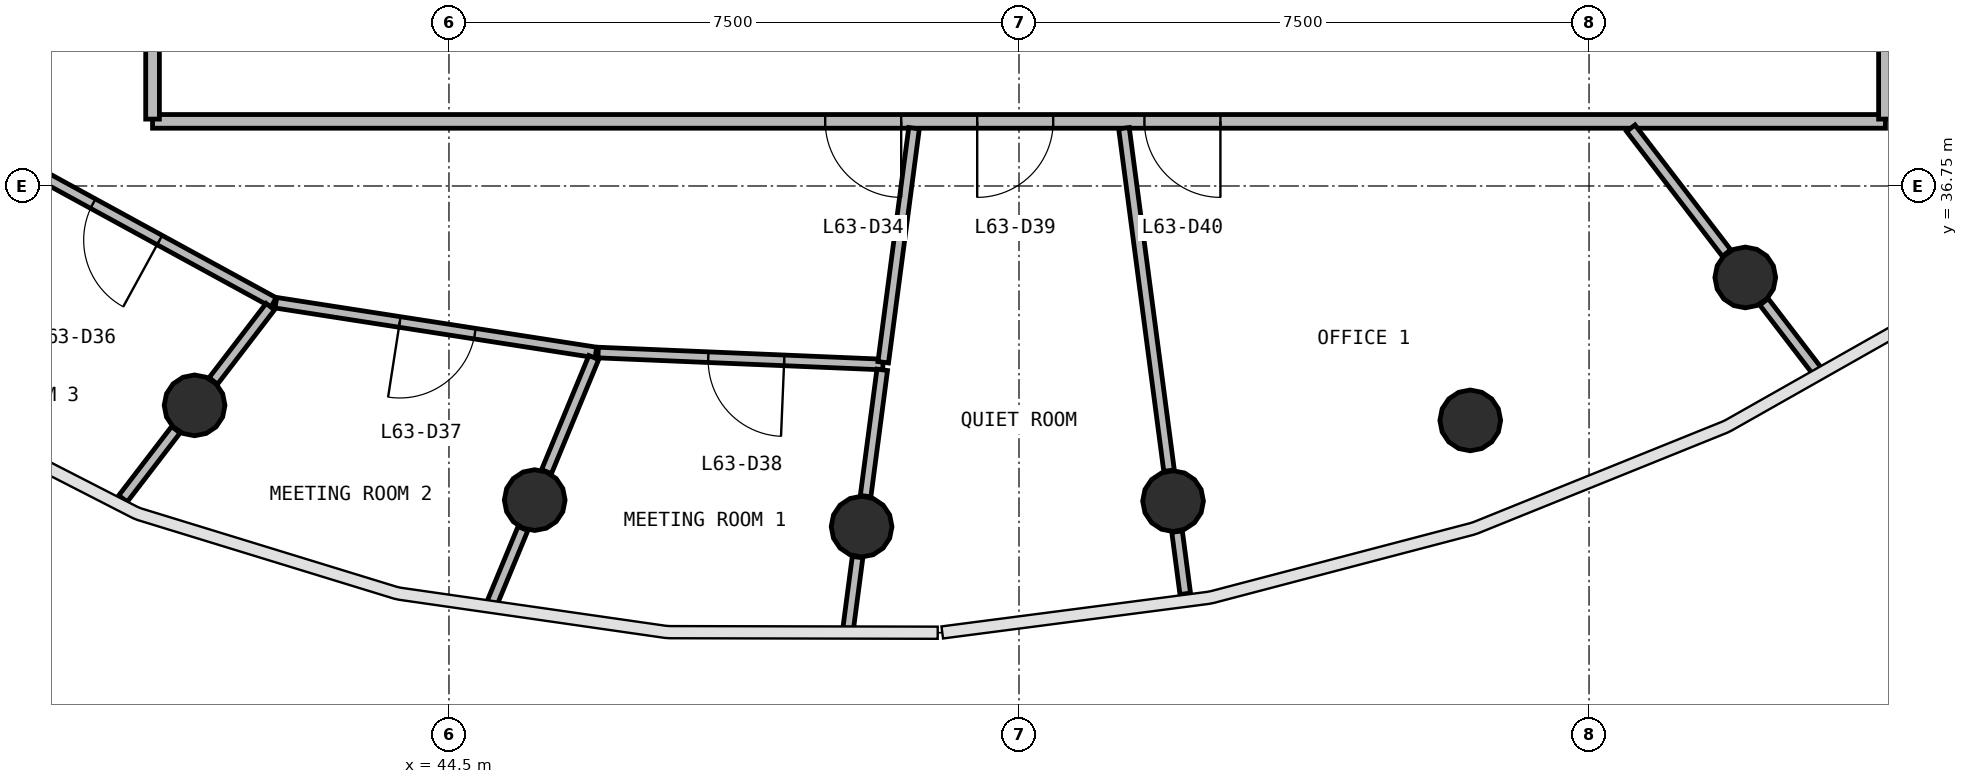
"""IFC4 building model, lengths in metres.
Left out: names, types, materials, properties, quantities, classifications, styles, units other than length and angle.
Written with IfcOpenShell. Run it as: python <this file> out.ifc"""

import sys

from ifc_helpers import new_model, si_unit, direction, frame, frame_2d, origin, origin_2d, place, context, subcontext, project, spatial, rectangle, circle, extrude, source, transform, mapped, element, fill, save


model = new_model("IFC4")
c1 = context("Model", 3, precision=1e-05, world=origin(), true_north=direction((0.0, 1.0)))
c2 = subcontext(c1, "Body", "Model", "MODEL_VIEW")
j1 = project(units=[si_unit("LENGTHUNIT", "METRE"), si_unit("PLANEANGLEUNIT", "RADIAN")], contexts=[c1])
p1 = place(None, origin())
s1 = spatial("IfcSite", under=j1, at=p1, CompositionType="ELEMENT")
p2 = place(p1, origin())
s2 = spatial("IfcBuilding", under=s1, at=p2, CompositionType="ELEMENT")
p3 = place(p2, frame((0.0, 0.0, 257.9)))
s3 = spatial("IfcBuildingStorey", under=s2, at=p3, CompositionType="ELEMENT", Elevation=257.9)
m1 = source(origin(), c2, "Body", "SweptSolid", [
    extrude(circle(Radius=0.4, at=origin_2d()), origin(), (0.0, 0.0, 1.0), 3.9),
])
for number, where, z_axis, x_axis in (
    (1, (41.153, 33.864, 0.0), (0.0, 0.0, 1.0), (1.0, 0.0, 0.0)),
    (2, (45.628, 32.617, 0.0), (0.0, 0.0, 1.0), (1.0, 0.0, 0.0)),
    (3, (49.929, 32.269, 0.0), (0.0, 0.0, 1.0), (1.0, 0.0, 0.0)),
    (4, (54.027, 32.604, 0.0), (0.0, 0.0, 1.0), (1.0, 0.0, 0.0)),
    (5, (57.937, 33.666, 0.0), (0.0, 0.0, 1.0), (1.0, 0.0, 0.0)),
    (6, (61.556, 35.547, 0.0), (0.0, 0.0, 1.0), (1.0, 0.0, 0.0)),
):
    element("IfcColumn", number, at=place(p3, frame(where, z_axis=z_axis, x_axis=x_axis)), inside=s3, PredefinedType="COLUMN", context=c2, shape_type="MappedRepresentation", body=[
        mapped(m1, transform((0.0, 0.0, 0.0), scale=1.0)),
    ])
p4 = place(p3, frame((63.4, 37.6, 0.0), z_axis=(0.0, 0.0, 1.0), x_axis=(-1.0, 0.0, 0.0)))
e7 = element("IfcWall", 7, at=p4, inside=s3, PredefinedType="PARTITIONING", context=c2, shape_type="SweptSolid", body=[
    extrude(rectangle(XDim=22.8, YDim=0.18, at=frame_2d((11.4, 0.0))), origin(), (0.0, 0.0, 1.0), 2.88),
])
p5 = place(p4, frame((12.95, 0.0, 0.0)))
e8 = element("IfcOpeningElement", 8, at=p5, cuts=e7, PredefinedType="OPENING", context=c2, shape_type="SweptSolid", body=[
    extrude(rectangle(XDim=1.0, YDim=2.1, at=frame_2d((0.5, 1.05))), frame((0.0, 0.1, 0.0), z_axis=(0.0, -1.0, 0.0), x_axis=(1.0, 0.0, 0.0)), (0.0, 0.0, 1.0), 0.2),
])
p6 = place(p4, frame((10.95, 0.0, 0.0)))
e9 = element("IfcOpeningElement", 9, at=p6, cuts=e7, PredefinedType="OPENING", context=c2, shape_type="SweptSolid", body=[
    extrude(rectangle(XDim=1.0, YDim=2.1, at=frame_2d((0.5, 1.05))), frame((0.0, 0.1, 0.0), z_axis=(0.0, -1.0, 0.0), x_axis=(1.0, 0.0, 0.0)), (0.0, 0.0, 1.0), 0.2),
])
p7 = place(p4, frame((8.75, 0.0, 0.0)))
e10 = element("IfcOpeningElement", 10, at=p7, cuts=e7, PredefinedType="OPENING", context=c2, shape_type="SweptSolid", body=[
    extrude(rectangle(XDim=1.0, YDim=2.1, at=frame_2d((0.5, 1.05))), frame((0.0, 0.1, 0.0), z_axis=(0.0, -1.0, 0.0), x_axis=(1.0, 0.0, 0.0)), (0.0, 0.0, 1.0), 0.2),
])
p8 = place(p3, frame((63.4, 58.37, 0.0), z_axis=(0.0, 0.0, 1.0), x_axis=(0.0, -1.0, 0.0)))
e11 = element("IfcWall", 11, at=p8, inside=s3, PredefinedType="PARTITIONING", context=c2, shape_type="SweptSolid", body=[
    extrude(rectangle(XDim=20.74, YDim=0.18, at=frame_2d((10.37, 0.0))), origin(), (0.0, 0.0, 1.0), 2.88),
])
p9 = place(p8, frame((9.99, 0.0, 0.0)))
e12 = element("IfcOpeningElement", 12, at=p9, cuts=e11, PredefinedType="OPENING", context=c2, shape_type="SweptSolid", body=[
    extrude(rectangle(XDim=0.9, YDim=2.1, at=frame_2d((0.45, 1.05))), frame((0.0, 0.1, 0.0), z_axis=(0.0, -1.0, 0.0), x_axis=(1.0, 0.0, 0.0)), (0.0, 0.0, 1.0), 0.2),
])
p10 = place(p8, frame((7.79, 0.0, 0.0)))
e13 = element("IfcOpeningElement", 13, at=p10, cuts=e11, PredefinedType="OPENING", context=c2, shape_type="SweptSolid", body=[
    extrude(rectangle(XDim=0.9, YDim=2.1, at=frame_2d((0.45, 1.05))), frame((0.0, 0.1, 0.0), z_axis=(0.0, -1.0, 0.0), x_axis=(1.0, 0.0, 0.0)), (0.0, 0.0, 1.0), 0.2),
])
p11 = place(p8, frame((4.29, 0.0, 0.0)))
e14 = element("IfcOpeningElement", 14, at=p11, cuts=e11, PredefinedType="OPENING", context=c2, shape_type="SweptSolid", body=[
    extrude(rectangle(XDim=1.0, YDim=2.1, at=frame_2d((0.5, 1.05))), frame((0.0, 0.1, 0.0), z_axis=(0.0, -1.0, 0.0), x_axis=(1.0, 0.0, 0.0)), (0.0, 0.0, 1.0), 0.2),
])
p12 = place(p8, frame((15.49, 0.0, 0.0)))
e15 = element("IfcOpeningElement", 15, at=p12, cuts=e11, PredefinedType="OPENING", context=c2, shape_type="SweptSolid", body=[
    extrude(rectangle(XDim=1.0, YDim=2.1, at=frame_2d((0.5, 1.05))), frame((0.0, 0.1, 0.0), z_axis=(0.0, -1.0, 0.0), x_axis=(1.0, 0.0, 0.0)), (0.0, 0.0, 1.0), 0.2),
])
p13 = place(p8, frame((12.09, 0.0, 0.0)))
e16 = element("IfcOpeningElement", 16, at=p13, cuts=e11, PredefinedType="OPENING", context=c2, shape_type="SweptSolid", body=[
    extrude(rectangle(XDim=1.0, YDim=2.1, at=frame_2d((0.5, 1.05))), frame((0.0, 0.1, 0.0), z_axis=(0.0, -1.0, 0.0), x_axis=(1.0, 0.0, 0.0)), (0.0, 0.0, 1.0), 0.2),
])
p14 = place(p3, frame((40.6, 37.63, 0.0), z_axis=(0.0, 0.0, 1.0), x_axis=(0.0, 1.0, 0.0)))
e17 = element("IfcWall", 17, at=p14, inside=s3, PredefinedType="PARTITIONING", context=c2, shape_type="SweptSolid", body=[
    extrude(rectangle(XDim=20.74, YDim=0.18, at=frame_2d((10.37, 0.0))), origin(), (0.0, 0.0, 1.0), 2.88),
])
p15 = place(p14, frame((12.09, 0.0, 0.0)))
e18 = element("IfcOpeningElement", 18, at=p15, cuts=e17, PredefinedType="OPENING", context=c2, shape_type="SweptSolid", body=[
    extrude(rectangle(XDim=1.0, YDim=2.1, at=frame_2d((0.5, 1.05))), frame((0.0, 0.1, 0.0), z_axis=(0.0, -1.0, 0.0), x_axis=(1.0, 0.0, 0.0)), (0.0, 0.0, 1.0), 0.2),
])
p16 = place(p14, frame((9.89, 0.0, 0.0)))
e19 = element("IfcOpeningElement", 19, at=p16, cuts=e17, PredefinedType="OPENING", context=c2, shape_type="SweptSolid", body=[
    extrude(rectangle(XDim=1.0, YDim=2.1, at=frame_2d((0.5, 1.05))), frame((0.0, 0.1, 0.0), z_axis=(0.0, -1.0, 0.0), x_axis=(1.0, 0.0, 0.0)), (0.0, 0.0, 1.0), 0.2),
])
p17 = place(p3, frame((53.381, 37.51, 0.0), z_axis=(0.0, 0.0, 1.0), x_axis=(0.130505936446, -0.991447527887, 0.0)))
e20 = element("IfcWall", 20, at=p17, inside=s3, PredefinedType="PARTITIONING", context=c2, shape_type="SweptSolid", body=[
    extrude(rectangle(XDim=4.544, YDim=0.14, at=frame_2d((2.272, 0.0))), origin(), (0.0, 0.0, 1.0), 2.88),
])
p18 = place(p3, frame((42.193, 35.219, 0.0), z_axis=(0.0, 0.0, 1.0), x_axis=(-0.877448984614, 0.479669969249, 0.0)))
e21 = element("IfcWall", 21, at=p18, inside=s3, PredefinedType="PARTITIONING", context=c2, shape_type="SweptSolid", body=[
    extrude(rectangle(XDim=4.558, YDim=0.14, at=frame_2d((2.279, 0.0))), origin(), (0.0, 0.0, 1.0), 2.88),
])
p19 = place(p18, frame((1.708, 0.0, 0.0)))
e22 = element("IfcOpeningElement", 22, at=p19, cuts=e21, PredefinedType="OPENING", context=c2, shape_type="SweptSolid", body=[
    extrude(rectangle(XDim=1.0, YDim=2.1, at=frame_2d((0.5, 1.05))), frame((0.0, 0.08, 0.0), z_axis=(0.0, -1.0, 0.0), x_axis=(1.0, 0.0, 0.0)), (0.0, 0.0, 1.0), 0.16),
])
p20 = place(p3, frame((46.433, 34.56, 0.0), z_axis=(0.0, 0.0, 1.0), x_axis=(-0.988131354716, 0.153611281572, 0.0)))
e23 = element("IfcWall", 23, at=p20, inside=s3, PredefinedType="PARTITIONING", context=c2, shape_type="SweptSolid", body=[
    extrude(rectangle(XDim=4.261, YDim=0.14, at=frame_2d((2.13, 0.0))), origin(), (0.0, 0.0, 1.0), 2.88),
])
p21 = place(p20, frame((1.611, 0.0, 0.0)))
e24 = element("IfcOpeningElement", 24, at=p21, cuts=e23, PredefinedType="OPENING", context=c2, shape_type="SweptSolid", body=[
    extrude(rectangle(XDim=1.0, YDim=2.1, at=frame_2d((0.5, 1.05))), frame((0.0, 0.08, 0.0), z_axis=(0.0, -1.0, 0.0), x_axis=(1.0, 0.0, 0.0)), (0.0, 0.0, 1.0), 0.16),
])
p22 = place(p3, frame((50.21, 34.401, 0.0), z_axis=(0.0, 0.0, 1.0), x_axis=(-0.999118002039, 0.041990689471, 0.0)))
e25 = element("IfcWall", 25, at=p22, inside=s3, PredefinedType="PARTITIONING", context=c2, shape_type="SweptSolid", body=[
    extrude(rectangle(XDim=3.75, YDim=0.14, at=frame_2d((1.875, 0.0))), origin(), (0.0, 0.0, 1.0), 2.88),
])
p23 = place(p22, frame((1.3, 0.0, 0.0)))
e26 = element("IfcOpeningElement", 26, at=p23, cuts=e25, PredefinedType="OPENING", context=c2, shape_type="SweptSolid", body=[
    extrude(rectangle(XDim=1.0, YDim=2.1, at=frame_2d((0.5, 1.05))), frame((0.0, 0.08, 0.0), z_axis=(0.0, -1.0, 0.0), x_axis=(1.0, 0.0, 0.0)), (0.0, 0.0, 1.0), 0.16),
])
p24 = place(p3, frame((50.619, 37.51, 0.0), z_axis=(0.0, 0.0, 1.0), x_axis=(-0.130495182838, -0.991448943343, 0.0)))
e27 = element("IfcWall", 27, at=p24, inside=s3, PredefinedType="PARTITIONING", context=c2, shape_type="SweptSolid", body=[
    extrude(rectangle(XDim=3.106, YDim=0.14, at=frame_2d((1.553, 0.0))), origin(), (0.0, 0.0, 1.0), 2.88),
])
p25 = place(p3, frame((60.049, 37.51, 0.0), z_axis=(0.0, 0.0, 1.0), x_axis=(0.608701397958, -0.793399400128, 0.0)))
e28 = element("IfcWall", 28, at=p25, inside=s3, PredefinedType="PARTITIONING", context=c2, shape_type="SweptSolid", body=[
    extrude(rectangle(XDim=2.07, YDim=0.14, at=frame_2d((1.035, 0.0))), origin(), (0.0, 0.0, 1.0), 2.88),
])
p26 = place(p3, frame((50.2, 34.331, 0.0), z_axis=(0.0, 0.0, 1.0), x_axis=(-0.13054119413, -0.991442886219, 0.0)))
e29 = element("IfcWall", 29, at=p26, inside=s3, PredefinedType="PARTITIONING", context=c2, shape_type="SweptSolid", body=[
    extrude(rectangle(XDim=1.676, YDim=0.14, at=frame_2d((0.838, 0.0))), origin(), (0.0, 0.0, 1.0), 2.88),
])
p27 = place(p3, frame((46.405, 34.493, 0.0), z_axis=(0.0, 0.0, 1.0), x_axis=(-0.382705531501, -0.92387037844, 0.0)))
e30 = element("IfcWall", 30, at=p27, inside=s3, PredefinedType="PARTITIONING", context=c2, shape_type="SweptSolid", body=[
    extrude(rectangle(XDim=1.625, YDim=0.14, at=frame_2d((0.813, 0.0))), origin(), (0.0, 0.0, 1.0), 2.88),
])
p28 = place(p3, frame((42.15, 35.163, 0.0), z_axis=(0.0, 0.0, 1.0), x_axis=(-0.608839083006, -0.793293748245, 0.0)))
e31 = element("IfcWall", 31, at=p28, inside=s3, PredefinedType="PARTITIONING", context=c2, shape_type="SweptSolid", body=[
    extrude(rectangle(XDim=1.232, YDim=0.14, at=frame_2d((0.616, 0.0))), origin(), (0.0, 0.0, 1.0), 2.88),
])
for number, where, z_axis, x_axis in (
    (32, (61.802, 35.226, 0.0), (0.0, 0.0, 1.0), (0.609, -0.793, 0.0)),
    (33, (40.907, 33.543, 0.0), (0.0, 0.0, 1.0), (-0.609, -0.793, 0.0)),
):
    element("IfcWall", number, at=place(p3, frame(where, z_axis=z_axis, x_axis=x_axis)), inside=s3, PredefinedType="PARTITIONING", context=c2, shape_type="SweptSolid", body=[
        extrude(rectangle(XDim=1.143, YDim=0.14, at=frame_2d((0.571, 0.0))), origin(), (0.0, 0.0, 1.0), 2.88),
    ])
p29 = place(p3, frame((45.473, 32.243, 0.0), z_axis=(0.0, 0.0, 1.0), x_axis=(-0.382703871955, -0.923871065891, 0.0)))
e34 = element("IfcWall", 34, at=p29, inside=s3, PredefinedType="PARTITIONING", context=c2, shape_type="SweptSolid", body=[
    extrude(rectangle(XDim=1.062, YDim=0.14, at=frame_2d((0.531, 0.0))), origin(), (0.0, 0.0, 1.0), 2.88),
])
p30 = place(p3, frame((49.876, 31.868, 0.0), z_axis=(0.0, 0.0, 1.0), x_axis=(-0.130588295536, -0.991436683338, 0.0)))
e35 = element("IfcWall", 35, at=p30, inside=s3, PredefinedType="PARTITIONING", context=c2, shape_type="SweptSolid", body=[
    extrude(rectangle(XDim=0.944, YDim=0.14, at=frame_2d((0.472, 0.0))), origin(), (0.0, 0.0, 1.0), 2.88),
])
p31 = place(p3, frame((54.08, 32.203, 0.0), z_axis=(0.0, 0.0, 1.0), x_axis=(0.130768286444, -0.991412958994, 0.0)))
e36 = element("IfcWall", 36, at=p31, inside=s3, PredefinedType="PARTITIONING", context=c2, shape_type="SweptSolid", body=[
    extrude(rectangle(XDim=0.825, YDim=0.14, at=frame_2d((0.413, 0.0))), origin(), (0.0, 0.0, 1.0), 2.88),
])
m2 = source(origin(), c2, "Body", "SweptSolid", [
    extrude(rectangle(XDim=1.0, YDim=2.1, at=frame_2d((0.5, 1.05))), frame((0.0, 0.025, 0.0), z_axis=(0.0, -1.0, 0.0), x_axis=(1.0, 0.0, 0.0)), (0.0, 0.0, 1.0), 0.05),
])
p32 = place(p5, origin())
e37 = element("IfcDoor", 37, at=p32, inside=s3, OperationType="SINGLE_SWING_LEFT", PredefinedType="DOOR", context=c2, shape_type="MappedRepresentation", body=[
    mapped(m2, transform((0.0, 0.0, 0.0), scale=1.0)),
])
fill(e8, e37)
p33 = place(p19, origin())
e38 = element("IfcDoor", 38, at=p33, inside=s3, OperationType="SINGLE_SWING_LEFT", PredefinedType="DOOR", context=c2, shape_type="MappedRepresentation", body=[
    mapped(m2, transform((0.0, 0.0, 0.0), scale=1.0)),
])
fill(e22, e38)
p34 = place(p21, origin())
e39 = element("IfcDoor", 39, at=p34, inside=s3, OperationType="SINGLE_SWING_RIGHT", PredefinedType="DOOR", context=c2, shape_type="MappedRepresentation", body=[
    mapped(m2, transform((0.0, 0.0, 0.0), scale=1.0)),
])
fill(e24, e39)
p35 = place(p23, origin())
e40 = element("IfcDoor", 40, at=p35, inside=s3, OperationType="SINGLE_SWING_LEFT", PredefinedType="DOOR", context=c2, shape_type="MappedRepresentation", body=[
    mapped(m2, transform((0.0, 0.0, 0.0), scale=1.0)),
])
fill(e26, e40)
p36 = place(p6, origin())
e41 = element("IfcDoor", 41, at=p36, inside=s3, OperationType="SINGLE_SWING_RIGHT", PredefinedType="DOOR", context=c2, shape_type="MappedRepresentation", body=[
    mapped(m2, transform((0.0, 0.0, 0.0), scale=1.0)),
])
fill(e9, e41)
p37 = place(p7, origin())
e42 = element("IfcDoor", 42, at=p37, inside=s3, OperationType="SINGLE_SWING_LEFT", PredefinedType="DOOR", context=c2, shape_type="MappedRepresentation", body=[
    mapped(m2, transform((0.0, 0.0, 0.0), scale=1.0)),
])
fill(e10, e42)
save(model, sys.argv[1])
